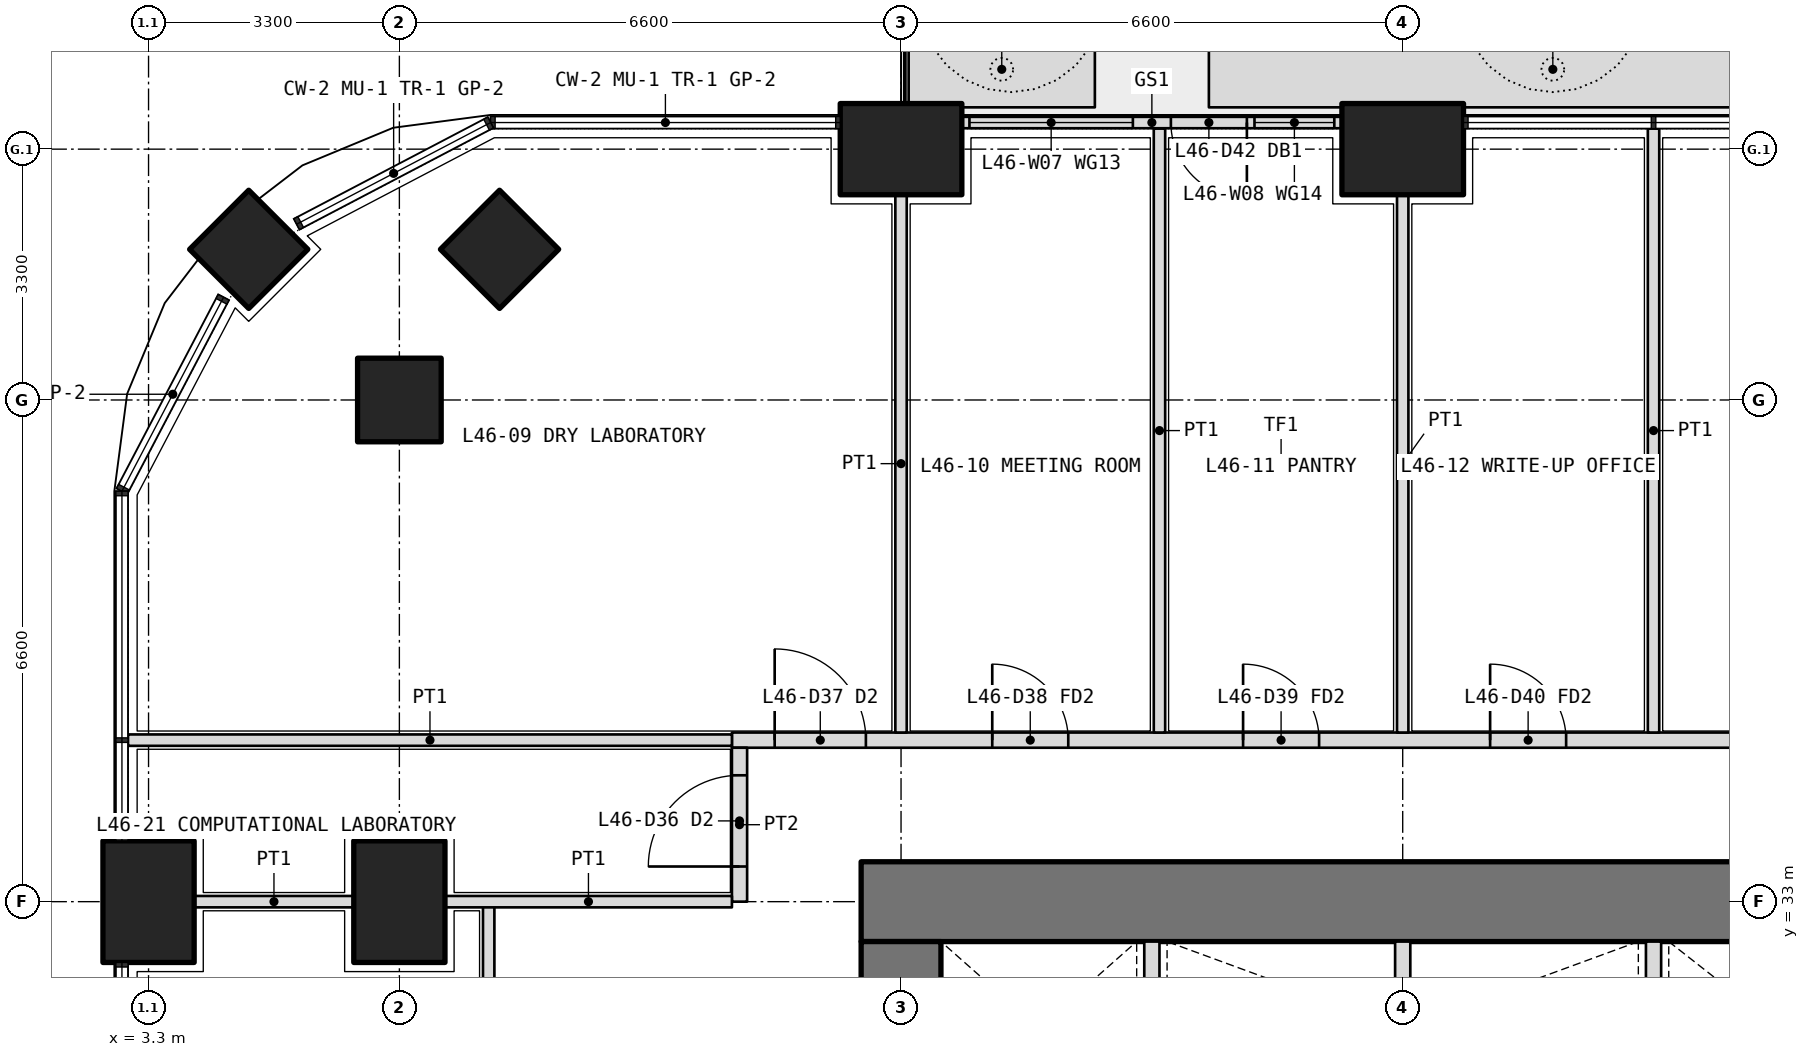
"""IFC4 building model, lengths in metres.
Left out: names, types, materials, properties, quantities, classifications, styles, units other than length and angle.
Written with IfcOpenShell. Run it as: python <this file> out.ifc"""

import sys

from ifc_helpers import new_model, si_unit, direction, frame, frame_2d, origin, origin_2d, place, context, subcontext, project, spatial, polyline, rectangle, outline, extrude, element, fill, save


model = new_model("IFC4")
c1 = context("Model", 3, precision=1e-05, world=origin(), true_north=direction((0.0, 1.0)))
c2 = subcontext(c1, "Body", "Model", "MODEL_VIEW")
j1 = project(units=[si_unit("LENGTHUNIT", "METRE"), si_unit("PLANEANGLEUNIT", "RADIAN")], contexts=[c1])
p1 = place(None, origin())
s1 = spatial("IfcSite", under=j1, at=p1, CompositionType="ELEMENT")
p2 = place(p1, origin())
s2 = spatial("IfcBuilding", under=s1, at=p2, CompositionType="ELEMENT")
p3 = place(p2, frame((0.0, 0.0, 201.9)))
s3 = spatial("IfcBuildingStorey", under=s2, at=p3, CompositionType="ELEMENT", Elevation=201.9)
p4 = place(p3, frame((4.618, 41.582, 0.0), z_axis=(0.0, 0.0, 1.0), x_axis=(0.707106781187, 0.707106781187, 0.0)))
e1 = element("IfcColumn", 1, at=p4, inside=s3, PredefinedType="COLUMN", context=c2, shape_type="SweptSolid", body=[
    extrude(rectangle(XDim=1.1, YDim=1.1, at=origin_2d()), origin(), (0.0, 0.0, 1.0), 4.2),
])
for number, where, z_axis, x_axis in (
    (2, (3.3, 33.0, 0.0), (0.0, 0.0, 1.0), (0.0, 1.0, 0.0)),
    (3, (13.2, 42.9, 0.0), (0.0, 0.0, 1.0), (1.0, 0.0, 0.0)),
    (4, (19.8, 42.9, 0.0), (0.0, 0.0, 1.0), (1.0, 0.0, 0.0)),
):
    element("IfcColumn", number, at=place(p3, frame(where, z_axis=z_axis, x_axis=x_axis)), inside=s3, PredefinedType="COLUMN", context=c2, shape_type="SweptSolid", body=[
        extrude(rectangle(XDim=1.6, YDim=1.2, at=origin_2d()), origin(), (0.0, 0.0, 1.0), 4.2),
    ])
for number, where, z_axis, x_axis in (
    (5, (6.6, 39.6, 0.0), (0.0, 0.0, 1.0), (1.0, 0.0, 0.0)),
    (6, (7.918, 41.582, 0.0), (0.0, 0.0, 1.0), (0.707, 0.707, 0.0)),
):
    element("IfcColumn", number, at=place(p3, frame(where, z_axis=z_axis, x_axis=x_axis)), inside=s3, PredefinedType="COLUMN", context=c2, shape_type="SweptSolid", body=[
        extrude(rectangle(XDim=1.1, YDim=1.1, at=origin_2d()), origin(), (0.0, 0.0, 1.0), 4.2),
    ])
p5 = place(p3, frame((6.6, 33.0, 0.0), z_axis=(0.0, 0.0, 1.0), x_axis=(0.0, 1.0, 0.0)))
e7 = element("IfcColumn", 7, at=p5, inside=s3, PredefinedType="COLUMN", context=c2, shape_type="SweptSolid", body=[
    extrude(rectangle(XDim=1.6, YDim=1.2, at=origin_2d()), origin(), (0.0, 0.0, 1.0), 4.2),
])
p6 = place(p3, origin())
e8 = element("IfcWall", 8, at=p6, inside=s3, PredefinedType="USERDEFINED", context=c2, shape_type="SweptSolid", body=[
    extrude(outline(polyline([(13.3, 43.45), (15.75, 43.45), (15.75, 44.45), (13.3, 44.45), (13.3, 43.45)]), holes=[polyline([(13.45, 43.6), (15.6, 43.6), (15.6, 44.3), (13.45, 44.3), (13.45, 43.6)])]), origin(), (0.0, 0.0, 1.0), 1.05),
])
p7 = place(p3, origin())
e9 = element("IfcWall", 9, at=p7, inside=s3, PredefinedType="USERDEFINED", context=c2, shape_type="SweptSolid", body=[
    extrude(outline(polyline([(17.25, 43.45), (26.3, 43.45), (26.3, 44.45), (17.25, 44.45), (17.25, 43.45)]), holes=[polyline([(17.4, 43.6), (26.15, 43.6), (26.15, 44.3), (17.4, 44.3), (17.4, 43.6)])]), origin(), (0.0, 0.0, 1.0), 1.05),
])
p8 = place(p3, frame((19.0, 43.25, 0.0), z_axis=(0.0, 0.0, 1.0), x_axis=(-1.0, 0.0, 0.0)))
e10 = element("IfcWall", 10, at=p8, inside=s3, PredefinedType="SOLIDWALL", context=c2, shape_type="SweptSolid", body=[
    extrude(rectangle(XDim=5.0, YDim=0.15, at=frame_2d((2.5, 0.0))), origin(), (0.0, 0.0, 1.0), 2.7),
])
p9 = place(p8, frame((1.25, 0.0, 0.0)))
e11 = element("IfcOpeningElement", 11, at=p9, cuts=e10, PredefinedType="OPENING", context=c2, shape_type="SweptSolid", body=[
    extrude(rectangle(XDim=1.0, YDim=2.4, at=frame_2d((0.5, 1.2))), frame((0.0, 0.085, 0.0), z_axis=(0.0, -1.0, 0.0), x_axis=(1.0, 0.0, 0.0)), (0.0, 0.0, 1.0), 0.17),
])
p10 = place(p8, frame((0.1, 0.0, 0.1)))
e12 = element("IfcOpeningElement", 12, at=p10, cuts=e10, PredefinedType="OPENING", context=c2, shape_type="SweptSolid", body=[
    extrude(rectangle(XDim=1.05, YDim=2.3, at=frame_2d((0.525, 1.15))), frame((0.0, 0.085, 0.0), z_axis=(0.0, -1.0, 0.0), x_axis=(1.0, 0.0, 0.0)), (0.0, 0.0, 1.0), 0.17),
])
p11 = place(p8, frame((2.75, 0.0, 0.1)))
e13 = element("IfcOpeningElement", 13, at=p11, cuts=e10, PredefinedType="OPENING", context=c2, shape_type="SweptSolid", body=[
    extrude(rectangle(XDim=2.15, YDim=2.3, at=frame_2d((1.075, 1.15))), frame((0.0, 0.085, 0.0), z_axis=(0.0, -1.0, 0.0), x_axis=(1.0, 0.0, 0.0)), (0.0, 0.0, 1.0), 0.17),
])
p12 = place(p3, frame((40.125, 33.0, 0.0), z_axis=(0.0, 0.0, 1.0), x_axis=(-1.0, 0.0, 0.0)))
e14 = element("IfcWall", 14, at=p12, inside=s3, PredefinedType="SHEAR", context=c2, shape_type="SweptSolid", body=[
    extrude(rectangle(XDim=27.45, YDim=1.05, at=frame_2d((13.725, 0.0))), origin(), (0.0, 0.0, 1.0), 4.2),
])
p13 = place(p3, frame((13.2, 32.475, 0.0), z_axis=(0.0, 0.0, 1.0), x_axis=(0.0, -1.0, 0.0)))
e15 = element("IfcWall", 15, at=p13, inside=s3, PredefinedType="SHEAR", context=c2, shape_type="SweptSolid", body=[
    extrude(rectangle(XDim=18.75, YDim=1.05, at=frame_2d((9.375, 0.0))), origin(), (0.0, 0.0, 1.0), 4.2),
])
p14 = place(p13, frame((14.125, 0.0, 0.0)))
e16 = element("IfcOpeningElement", 16, at=p14, cuts=e15, PredefinedType="OPENING", context=c2, shape_type="SweptSolid", body=[
    extrude(rectangle(XDim=1.6, YDim=2.1, at=frame_2d((0.8, 1.05))), frame((0.0, 0.535, 0.0), z_axis=(0.0, -1.0, 0.0), x_axis=(1.0, 0.0, 0.0)), (0.0, 0.0, 1.0), 1.07),
])
p15 = place(p13, frame((3.325, 0.0, 0.0)))
e17 = element("IfcOpeningElement", 17, at=p15, cuts=e15, PredefinedType="OPENING", context=c2, shape_type="SweptSolid", body=[
    extrude(rectangle(XDim=1.6, YDim=2.1, at=frame_2d((0.8, 1.05))), frame((0.0, 0.535, 0.0), z_axis=(0.0, -1.0, 0.0), x_axis=(1.0, 0.0, 0.0)), (0.0, 0.0, 1.0), 1.07),
])
for number, where, z_axis, x_axis in (
    (18, (16.5, 30.2, 0.0), (0.0, 0.0, 1.0), (0.0, 1.0, 0.0)),
    (19, (19.8, 30.2, 0.0), (0.0, 0.0, 1.0), (0.0, 1.0, 0.0)),
    (20, (23.1, 30.2, 0.0), (0.0, 0.0, 1.0), (0.0, 1.0, 0.0)),
):
    element("IfcWall", number, at=place(p3, frame(where, z_axis=z_axis, x_axis=x_axis)), inside=s3, PredefinedType="PARTITIONING", context=c2, shape_type="SweptSolid", body=[
        extrude(rectangle(XDim=2.275, YDim=0.2, at=frame_2d((1.138, 0.0))), origin(), (0.0, 0.0, 1.0), 4.2),
    ])
p16 = place(p3, frame((10.975, 35.125, 0.0), z_axis=(0.0, 0.0, 1.0), x_axis=(1.0, 0.0, 0.0)))
e21 = element("IfcWall", 21, at=p16, inside=s3, PredefinedType="PARTITIONING", context=c2, shape_type="SweptSolid", body=[
    extrude(rectangle(XDim=30.85, YDim=0.2, at=frame_2d((15.425, 0.0))), origin(), (0.0, 0.0, 1.0), 2.85),
])
p17 = place(p16, frame((0.562, 0.0, 0.0)))
e22 = element("IfcOpeningElement", 22, at=p17, cuts=e21, PredefinedType="OPENING", context=c2, shape_type="SweptSolid", body=[
    extrude(rectangle(XDim=1.2, YDim=2.1, at=frame_2d((0.6, 1.05))), frame((0.0, 0.11, 0.0), z_axis=(0.0, -1.0, 0.0), x_axis=(1.0, 0.0, 0.0)), (0.0, 0.0, 1.0), 0.22),
])
p18 = place(p16, frame((3.425, 0.0, 0.0)))
e23 = element("IfcOpeningElement", 23, at=p18, cuts=e21, PredefinedType="OPENING", context=c2, shape_type="SweptSolid", body=[
    extrude(rectangle(XDim=1.0, YDim=2.1, at=frame_2d((0.5, 1.05))), frame((0.0, 0.11, 0.0), z_axis=(0.0, -1.0, 0.0), x_axis=(1.0, 0.0, 0.0)), (0.0, 0.0, 1.0), 0.22),
])
p19 = place(p16, frame((6.725, 0.0, 0.0)))
e24 = element("IfcOpeningElement", 24, at=p19, cuts=e21, PredefinedType="OPENING", context=c2, shape_type="SweptSolid", body=[
    extrude(rectangle(XDim=1.0, YDim=2.1, at=frame_2d((0.5, 1.05))), frame((0.0, 0.11, 0.0), z_axis=(0.0, -1.0, 0.0), x_axis=(1.0, 0.0, 0.0)), (0.0, 0.0, 1.0), 0.22),
])
p20 = place(p16, frame((9.975, 0.0, 0.0)))
e25 = element("IfcOpeningElement", 25, at=p20, cuts=e21, PredefinedType="OPENING", context=c2, shape_type="SweptSolid", body=[
    extrude(rectangle(XDim=1.0, YDim=2.1, at=frame_2d((0.5, 1.05))), frame((0.0, 0.11, 0.0), z_axis=(0.0, -1.0, 0.0), x_axis=(1.0, 0.0, 0.0)), (0.0, 0.0, 1.0), 0.22),
])
p21 = place(p16, frame((20.938, 0.0, 0.0)))
e26 = element("IfcOpeningElement", 26, at=p21, cuts=e21, PredefinedType="OPENING", context=c2, shape_type="SweptSolid", body=[
    extrude(rectangle(XDim=1.0, YDim=2.1, at=frame_2d((0.5, 1.05))), frame((0.0, 0.11, 0.0), z_axis=(0.0, -1.0, 0.0), x_axis=(1.0, 0.0, 0.0)), (0.0, 0.0, 1.0), 0.22),
])
p22 = place(p3, frame((11.075, 33.0, 0.0), z_axis=(0.0, 0.0, 1.0), x_axis=(0.0, 1.0, 0.0)))
e27 = element("IfcWall", 27, at=p22, inside=s3, PredefinedType="PARTITIONING", context=c2, shape_type="SweptSolid", body=[
    extrude(rectangle(XDim=2.025, YDim=0.2, at=frame_2d((1.012, 0.0))), origin(), (0.0, 0.0, 1.0), 2.85),
])
p23 = place(p22, frame((0.462, 0.0, 0.0)))
e28 = element("IfcOpeningElement", 28, at=p23, cuts=e27, PredefinedType="OPENING", context=c2, shape_type="SweptSolid", body=[
    extrude(rectangle(XDim=1.2, YDim=2.1, at=frame_2d((0.6, 1.05))), frame((0.0, 0.11, 0.0), z_axis=(0.0, -1.0, 0.0), x_axis=(1.0, 0.0, 0.0)), (0.0, 0.0, 1.0), 0.22),
])
p24 = place(p3, frame((3.03, 35.125, 0.0), z_axis=(0.0, 0.0, 1.0), x_axis=(1.0, 0.0, 0.0)))
e29 = element("IfcWall", 29, at=p24, inside=s3, PredefinedType="PARTITIONING", context=c2, shape_type="SweptSolid", body=[
    extrude(rectangle(XDim=7.945, YDim=0.15, at=frame_2d((3.973, 0.0))), origin(), (0.0, 0.0, 1.0), 2.7),
])
p25 = place(p3, frame((16.6, 43.17, 0.0), z_axis=(0.0, 0.0, 1.0), x_axis=(0.0, -1.0, 0.0)))
e30 = element("IfcWall", 30, at=p25, inside=s3, PredefinedType="PARTITIONING", context=c2, shape_type="SweptSolid", body=[
    extrude(rectangle(XDim=7.945, YDim=0.15, at=frame_2d((3.972, 0.0))), origin(), (0.0, 0.0, 1.0), 2.7),
])
for number, where, z_axis, x_axis in (
    (31, (19.8, 42.3, 0.0), (0.0, 0.0, 1.0), (0.0, -1.0, 0.0)),
    (32, (13.2, 42.3, 0.0), (0.0, 0.0, 1.0), (0.0, -1.0, 0.0)),
):
    element("IfcWall", number, at=place(p3, frame(where, z_axis=z_axis, x_axis=x_axis)), inside=s3, PredefinedType="PARTITIONING", context=c2, shape_type="SweptSolid", body=[
        extrude(rectangle(XDim=7.075, YDim=0.15, at=frame_2d((3.538, 0.0))), origin(), (0.0, 0.0, 1.0), 2.85),
    ])
p26 = place(p3, frame((23.1, 43.17, 0.0), z_axis=(0.0, 0.0, 1.0), x_axis=(0.0, -1.0, 0.0)))
e33 = element("IfcWall", 33, at=p26, inside=s3, PredefinedType="PARTITIONING", context=c2, shape_type="SweptSolid", body=[
    extrude(rectangle(XDim=7.945, YDim=0.15, at=frame_2d((3.972, 0.0))), origin(), (0.0, 0.0, 1.0), 2.7),
])
p27 = place(p3, frame((7.775, 29.7, 0.0), z_axis=(0.0, 0.0, 1.0), x_axis=(0.0, 1.0, 0.0)))
e34 = element("IfcWall", 34, at=p27, inside=s3, PredefinedType="PARTITIONING", context=c2, shape_type="SweptSolid", body=[
    extrude(rectangle(XDim=3.3, YDim=0.15, at=frame_2d((1.65, 0.0))), origin(), (0.0, 0.0, 1.0), 2.85),
])
p28 = place(p27, frame((1.15, 0.0, 0.0)))
e35 = element("IfcOpeningElement", 35, at=p28, cuts=e34, PredefinedType="OPENING", context=c2, shape_type="SweptSolid", body=[
    extrude(rectangle(XDim=1.0, YDim=2.1, at=frame_2d((0.5, 1.05))), frame((0.0, 0.085, 0.0), z_axis=(0.0, -1.0, 0.0), x_axis=(1.0, 0.0, 0.0)), (0.0, 0.0, 1.0), 0.17),
])
p29 = place(p3, frame((3.9, 33.0, 0.0), z_axis=(0.0, 0.0, 1.0), x_axis=(1.0, 0.0, 0.0)))
e36 = element("IfcWall", 36, at=p29, inside=s3, PredefinedType="PARTITIONING", context=c2, shape_type="SweptSolid", body=[
    extrude(rectangle(XDim=2.1, YDim=0.15, at=frame_2d((1.05, 0.0))), origin(), (0.0, 0.0, 1.0), 2.85),
])
p30 = place(p3, frame((7.2, 33.0, 0.0), z_axis=(0.0, 0.0, 1.0), x_axis=(1.0, 0.0, 0.0)))
e37 = element("IfcWall", 37, at=p30, inside=s3, PredefinedType="PARTITIONING", context=c2, shape_type="SweptSolid", body=[
    extrude(rectangle(XDim=3.775, YDim=0.15, at=frame_2d((1.888, 0.0))), origin(), (0.0, 0.0, 1.0), 2.85),
])
p31 = place(p9, origin())
e38 = element("IfcDoor", 38, at=p31, inside=s3, OperationType="SINGLE_SWING_LEFT", PredefinedType="DOOR", context=c2, shape_type="SweptSolid", body=[
    extrude(rectangle(XDim=1.0, YDim=2.4, at=frame_2d((0.5, 1.2))), frame((0.0, 0.025, 0.0), z_axis=(0.0, -1.0, 0.0), x_axis=(1.0, 0.0, 0.0)), (0.0, 0.0, 1.0), 0.05),
])
fill(e11, e38)
p32 = place(p10, origin())
e39 = element("IfcWindow", 39, at=p32, inside=s3, PartitioningType="SINGLE_PANEL", PredefinedType="WINDOW", context=c2, shape_type="SweptSolid", body=[
    extrude(rectangle(XDim=1.05, YDim=2.3, at=frame_2d((0.525, 1.15))), frame((0.0, 0.03, 0.0), z_axis=(0.0, -1.0, 0.0), x_axis=(1.0, 0.0, 0.0)), (0.0, 0.0, 1.0), 0.06),
])
fill(e12, e39)
p33 = place(p11, origin())
e40 = element("IfcWindow", 40, at=p33, inside=s3, PartitioningType="SINGLE_PANEL", PredefinedType="WINDOW", context=c2, shape_type="SweptSolid", body=[
    extrude(rectangle(XDim=2.15, YDim=2.3, at=frame_2d((1.075, 1.15))), frame((0.0, 0.03, 0.0), z_axis=(0.0, -1.0, 0.0), x_axis=(1.0, 0.0, 0.0)), (0.0, 0.0, 1.0), 0.06),
])
fill(e13, e40)
p34 = place(p17, origin())
e41 = element("IfcDoor", 41, at=p34, inside=s3, OperationType="DOUBLE_DOOR_SINGLE_SWING", PredefinedType="DOOR", context=c2, shape_type="SweptSolid", body=[
    extrude(rectangle(XDim=1.2, YDim=2.1, at=frame_2d((0.6, 1.05))), frame((0.0, 0.025, 0.0), z_axis=(0.0, -1.0, 0.0), x_axis=(1.0, 0.0, 0.0)), (0.0, 0.0, 1.0), 0.05),
])
fill(e22, e41)
p35 = place(p18, origin())
e42 = element("IfcDoor", 42, at=p35, inside=s3, OperationType="SINGLE_SWING_LEFT", PredefinedType="DOOR", context=c2, shape_type="SweptSolid", body=[
    extrude(rectangle(XDim=1.0, YDim=2.1, at=frame_2d((0.5, 1.05))), frame((0.0, 0.025, 0.0), z_axis=(0.0, -1.0, 0.0), x_axis=(1.0, 0.0, 0.0)), (0.0, 0.0, 1.0), 0.05),
])
fill(e23, e42)
p36 = place(p19, origin())
e43 = element("IfcDoor", 43, at=p36, inside=s3, OperationType="SINGLE_SWING_LEFT", PredefinedType="DOOR", context=c2, shape_type="SweptSolid", body=[
    extrude(rectangle(XDim=1.0, YDim=2.1, at=frame_2d((0.5, 1.05))), frame((0.0, 0.025, 0.0), z_axis=(0.0, -1.0, 0.0), x_axis=(1.0, 0.0, 0.0)), (0.0, 0.0, 1.0), 0.05),
])
fill(e24, e43)
p37 = place(p20, origin())
e44 = element("IfcDoor", 44, at=p37, inside=s3, OperationType="SINGLE_SWING_LEFT", PredefinedType="DOOR", context=c2, shape_type="SweptSolid", body=[
    extrude(rectangle(XDim=1.0, YDim=2.1, at=frame_2d((0.5, 1.05))), frame((0.0, 0.025, 0.0), z_axis=(0.0, -1.0, 0.0), x_axis=(1.0, 0.0, 0.0)), (0.0, 0.0, 1.0), 0.05),
])
fill(e25, e44)
p38 = place(p23, origin())
e45 = element("IfcDoor", 45, at=p38, inside=s3, OperationType="DOUBLE_DOOR_SINGLE_SWING", PredefinedType="DOOR", context=c2, shape_type="SweptSolid", body=[
    extrude(rectangle(XDim=1.2, YDim=2.1, at=frame_2d((0.6, 1.05))), frame((0.0, 0.025, 0.0), z_axis=(0.0, -1.0, 0.0), x_axis=(1.0, 0.0, 0.0)), (0.0, 0.0, 1.0), 0.05),
])
fill(e28, e45)
save(model, sys.argv[1])
